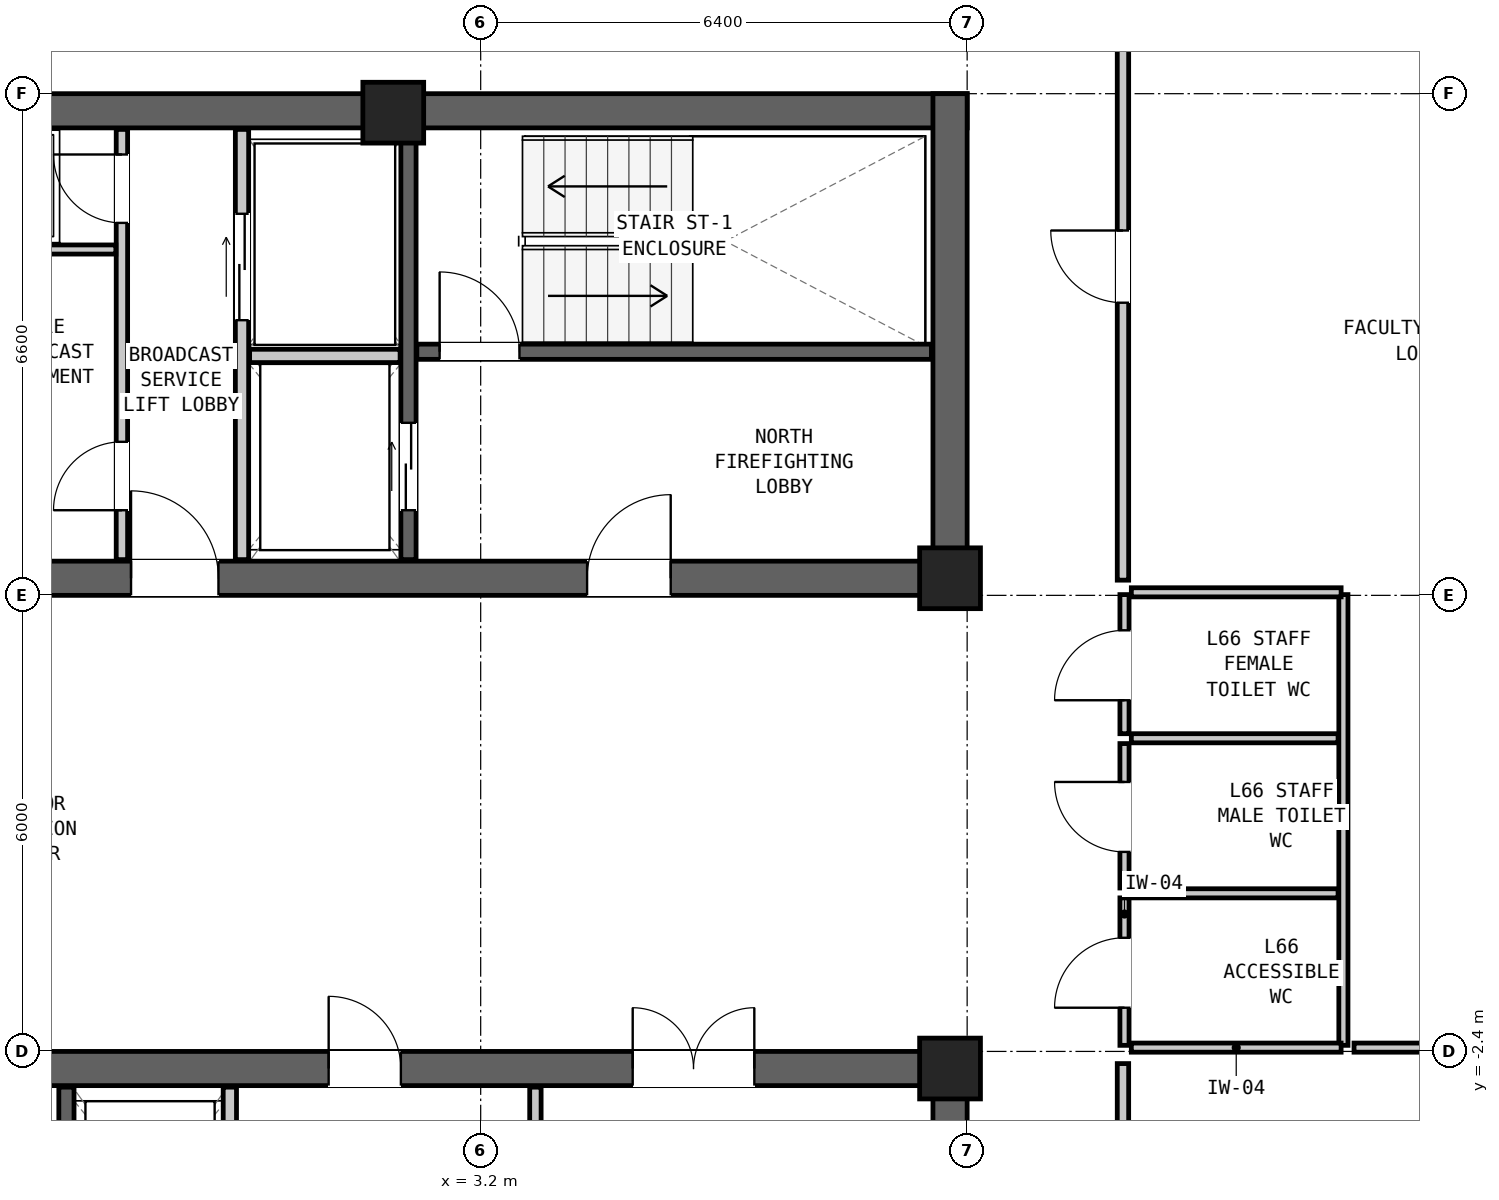
"""IFC4 building model, lengths in metres.
Left out: names, types, materials, properties, quantities, classifications, styles, units other than length and angle.
Written with IfcOpenShell. Run it as: python <this file> out.ifc"""

import sys

from ifc_helpers import new_model, si_unit, direction, frame, frame_2d, origin, origin_2d, place, context, subcontext, project, spatial, rectangle, extrude, element, fill, save


model = new_model("IFC4")
c1 = context("Model", 3, precision=1e-05, world=origin(), true_north=direction((0.0, 1.0)))
c2 = subcontext(c1, "Body", "Model", "MODEL_VIEW")
j1 = project(units=[si_unit("LENGTHUNIT", "METRE"), si_unit("PLANEANGLEUNIT", "RADIAN")], contexts=[c1])
p1 = place(None, origin())
s1 = spatial("IfcSite", under=j1, at=p1, CompositionType="ELEMENT")
p2 = place(p1, origin())
s2 = spatial("IfcBuilding", under=s1, at=p2, CompositionType="ELEMENT")
p3 = place(p2, frame((0.0, 0.0, 223.9)))
s3 = spatial("IfcBuildingStorey", under=s2, at=p3, CompositionType="ELEMENT", Elevation=223.9)
p4 = place(p3, frame((-9.6, 9.975, 0.0), z_axis=(0.0, 0.0, 1.0), x_axis=(1.0, 0.0, 0.0)))
e1 = element("IfcWall", 1, at=p4, inside=s3, PredefinedType="SHEAR", context=c2, shape_type="SweptSolid", body=[
    extrude(rectangle(XDim=19.2, YDim=0.45, at=frame_2d((9.6, 0.0))), origin(), (0.0, 0.0, 1.0), 3.05),
])
p5 = place(p3, frame((-9.6, 3.825, 0.0), z_axis=(0.0, 0.0, 1.0), x_axis=(1.0, 0.0, 0.0)))
e2 = element("IfcWall", 2, at=p5, inside=s3, PredefinedType="SHEAR", context=c2, shape_type="SweptSolid", body=[
    extrude(rectangle(XDim=19.2, YDim=0.45, at=frame_2d((9.6, 0.0))), origin(), (0.0, 0.0, 1.0), 3.05),
])
p6 = place(p5, frame((14.2, 0.0, 0.0)))
e3 = element("IfcOpeningElement", 3, at=p6, cuts=e2, PredefinedType="OPENING", context=c2, shape_type="SweptSolid", body=[
    extrude(rectangle(XDim=1.1, YDim=2.08, at=frame_2d((0.55, 1.04))), frame((0.0, 0.237, 0.0), z_axis=(0.0, -1.0, 0.0), x_axis=(1.0, 0.0, 0.0)), (0.0, 0.0, 1.0), 0.474),
])
p7 = place(p5, frame((8.2, 0.0, 0.0)))
e4 = element("IfcOpeningElement", 4, at=p7, cuts=e2, PredefinedType="OPENING", context=c2, shape_type="SweptSolid", body=[
    extrude(rectangle(XDim=1.15, YDim=2.1, at=frame_2d((0.575, 1.05))), frame((0.0, 0.237, 0.0), z_axis=(0.0, -1.0, 0.0), x_axis=(1.0, 0.0, 0.0)), (0.0, 0.0, 1.0), 0.474),
])
p8 = place(p5, frame((2.5, 0.0, 0.0)))
e5 = element("IfcOpeningElement", 5, at=p8, cuts=e2, PredefinedType="OPENING", context=c2, shape_type="SweptSolid", body=[
    extrude(rectangle(XDim=1.2, YDim=2.1, at=frame_2d((0.6, 1.05))), frame((0.0, 0.237, 0.0), z_axis=(0.0, -1.0, 0.0), x_axis=(1.0, 0.0, 0.0)), (0.0, 0.0, 1.0), 0.474),
])
p9 = place(p3, frame((9.375, 3.6, 0.0), z_axis=(0.0, 0.0, 1.0), x_axis=(0.0, 1.0, 0.0)))
e6 = element("IfcWall", 6, at=p9, inside=s3, PredefinedType="SHEAR", context=c2, shape_type="SweptSolid", body=[
    extrude(rectangle(XDim=6.6, YDim=0.45, at=frame_2d((3.3, 0.0))), origin(), (0.0, 0.0, 1.0), 3.05),
])
p10 = place(p3, frame((-9.6, -2.625, 0.0), z_axis=(0.0, 0.0, 1.0), x_axis=(1.0, 0.0, 0.0)))
e7 = element("IfcWall", 7, at=p10, inside=s3, PredefinedType="SHEAR", context=c2, shape_type="SweptSolid", body=[
    extrude(rectangle(XDim=19.2, YDim=0.45, at=frame_2d((9.6, 0.0))), origin(), (0.0, 0.0, 1.0), 3.05),
])
p11 = place(p10, frame((3.8, 0.0, 0.0)))
e8 = element("IfcOpeningElement", 8, at=p11, cuts=e7, PredefinedType="OPENING", context=c2, shape_type="SweptSolid", body=[
    extrude(rectangle(XDim=1.1, YDim=2.08, at=frame_2d((0.55, 1.04))), frame((0.0, 0.237, 0.0), z_axis=(0.0, -1.0, 0.0), x_axis=(1.0, 0.0, 0.0)), (0.0, 0.0, 1.0), 0.474),
])
p12 = place(p10, frame((10.8, 0.0, 0.0)))
e9 = element("IfcOpeningElement", 9, at=p12, cuts=e7, PredefinedType="OPENING", context=c2, shape_type="SweptSolid", body=[
    extrude(rectangle(XDim=0.95, YDim=2.1, at=frame_2d((0.475, 1.05))), frame((0.0, 0.237, 0.0), z_axis=(0.0, -1.0, 0.0), x_axis=(1.0, 0.0, 0.0)), (0.0, 0.0, 1.0), 0.474),
])
p13 = place(p10, frame((14.8, 0.0, 0.0)))
e10 = element("IfcOpeningElement", 10, at=p13, cuts=e7, PredefinedType="OPENING", context=c2, shape_type="SweptSolid", body=[
    extrude(rectangle(XDim=1.6, YDim=2.12, at=frame_2d((0.8, 1.06))), frame((0.0, 0.237, 0.0), z_axis=(0.0, -1.0, 0.0), x_axis=(1.0, 0.0, 0.0)), (0.0, 0.0, 1.0), 0.474),
])
p14 = place(p3, frame((9.375, -9.0, 0.0), z_axis=(0.0, 0.0, 1.0), x_axis=(0.0, 1.0, 0.0)))
e11 = element("IfcWall", 11, at=p14, inside=s3, PredefinedType="SHEAR", context=c2, shape_type="SweptSolid", body=[
    extrude(rectangle(XDim=6.6, YDim=0.45, at=frame_2d((3.3, 0.0))), origin(), (0.0, 0.0, 1.0), 3.05),
])
for number, where, z_axis, x_axis in (
    (12, (2.05, 9.95, 0.0), (0.0, 0.0, 1.0), (1.0, 0.0, 0.0)),
    (13, (9.375, 3.825, 0.0), (0.0, 0.0, 1.0), (1.0, 0.0, 0.0)),
    (14, (9.375, -2.625, 0.0), (0.0, 0.0, 1.0), (1.0, 0.0, 0.0)),
):
    element("IfcColumn", number, at=place(p3, frame(where, z_axis=z_axis, x_axis=x_axis)), inside=s3, PredefinedType="COLUMN", context=c2, shape_type="SweptSolid", body=[
        extrude(rectangle(XDim=0.8, YDim=0.8, at=origin_2d()), origin(), (0.0, 0.0, 1.0), 3.05),
    ])
p15 = place(p3, frame((2.36, 6.805, 0.0), z_axis=(0.0, 0.0, 1.0), x_axis=(1.0, 0.0, 0.0)))
e15 = element("IfcWall", 15, at=p15, inside=s3, PredefinedType="SHEAR", context=c2, shape_type="SweptSolid", body=[
    extrude(rectangle(XDim=6.77, YDim=0.2, at=frame_2d((3.385, 0.0))), origin(), (0.0, 0.0, 1.0), 2.86),
])
p16 = place(p15, frame((0.3, 0.0, 0.0)))
e16 = element("IfcOpeningElement", 16, at=p16, cuts=e15, PredefinedType="OPENING", context=c2, shape_type="SweptSolid", body=[
    extrude(rectangle(XDim=1.05, YDim=2.08, at=frame_2d((0.525, 1.04))), frame((0.0, 0.112, 0.0), z_axis=(0.0, -1.0, 0.0), x_axis=(1.0, 0.0, 0.0)), (0.0, 0.0, 1.0), 0.224),
])
p17 = place(p3, frame((2.25, 4.07, 0.0), z_axis=(0.0, 0.0, 1.0), x_axis=(0.0, 1.0, 0.0)))
e17 = element("IfcWall", 17, at=p17, inside=s3, PredefinedType="SHEAR", context=c2, shape_type="SweptSolid", body=[
    extrude(rectangle(XDim=5.66, YDim=0.2, at=frame_2d((2.83, 0.0))), origin(), (0.0, 0.0, 1.0), 2.86),
])
p18 = place(p17, frame((0.65, 0.0, 0.0)))
e18 = element("IfcOpeningElement", 18, at=p18, cuts=e17, PredefinedType="OPENING", context=c2, shape_type="SweptSolid", body=[
    extrude(rectangle(XDim=1.15, YDim=2.08, at=frame_2d((0.575, 1.04))), frame((0.0, 0.112, 0.0), z_axis=(0.0, -1.0, 0.0), x_axis=(1.0, 0.0, 0.0)), (0.0, 0.0, 1.0), 0.224),
])
p19 = place(p3, frame((0.06, 4.07, 0.0), z_axis=(0.0, 0.0, 1.0), x_axis=(0.0, 1.0, 0.0)))
e19 = element("IfcWall", 19, at=p19, inside=s3, PredefinedType="PARTITIONING", context=c2, shape_type="SweptSolid", body=[
    extrude(rectangle(XDim=5.66, YDim=0.175, at=frame_2d((2.83, 0.0))), origin(), (0.0, 0.0, 1.0), 2.86),
])
p20 = place(p19, frame((3.15, 0.0, 0.0)))
e20 = element("IfcOpeningElement", 20, at=p20, cuts=e19, PredefinedType="OPENING", context=c2, shape_type="SweptSolid", body=[
    extrude(rectangle(XDim=1.4, YDim=2.12, at=frame_2d((0.7, 1.06))), frame((0.0, 0.1, 0.0), z_axis=(0.0, -1.0, 0.0), x_axis=(1.0, 0.0, 0.0)), (0.0, 0.0, 1.0), 0.199),
])
p21 = place(p3, frame((0.16, 6.75, 0.0), z_axis=(0.0, 0.0, 1.0), x_axis=(1.0, 0.0, 0.0)))
e21 = element("IfcWall", 21, at=p21, inside=s3, PredefinedType="PARTITIONING", context=c2, shape_type="SweptSolid", body=[
    extrude(rectangle(XDim=1.98, YDim=0.175, at=frame_2d((0.99, 0.0))), origin(), (0.0, 0.0, 1.0), 2.86),
])
p22 = place(p3, frame((-1.52, 4.07, 0.0), z_axis=(0.0, 0.0, 1.0), x_axis=(0.0, 1.0, 0.0)))
e22 = element("IfcWall", 22, at=p22, inside=s3, PredefinedType="PARTITIONING", context=c2, shape_type="SweptSolid", body=[
    extrude(rectangle(XDim=5.66, YDim=0.15, at=frame_2d((2.83, 0.0))), origin(), (0.0, 0.0, 1.0), 2.86),
])
p23 = place(p22, frame((4.43, 0.0, 0.0)))
e23 = element("IfcOpeningElement", 23, at=p23, cuts=e22, PredefinedType="OPENING", context=c2, shape_type="SweptSolid", body=[
    extrude(rectangle(XDim=0.9, YDim=2.05, at=frame_2d((0.45, 1.025))), frame((0.0, 0.087, 0.0), z_axis=(0.0, -1.0, 0.0), x_axis=(1.0, 0.0, 0.0)), (0.0, 0.0, 1.0), 0.174),
])
p24 = place(p22, frame((0.65, 0.0, 0.0)))
e24 = element("IfcOpeningElement", 24, at=p24, cuts=e22, PredefinedType="OPENING", context=c2, shape_type="SweptSolid", body=[
    extrude(rectangle(XDim=0.9, YDim=2.05, at=frame_2d((0.45, 1.025))), frame((0.0, 0.087, 0.0), z_axis=(0.0, -1.0, 0.0), x_axis=(1.0, 0.0, 0.0)), (0.0, 0.0, 1.0), 0.174),
])
p25 = place(p3, frame((-2.96, 8.15, 0.0), z_axis=(0.0, 0.0, 1.0), x_axis=(1.0, 0.0, 0.0)))
e25 = element("IfcWall", 25, at=p25, inside=s3, PredefinedType="PARTITIONING", context=c2, shape_type="SweptSolid", body=[
    extrude(rectangle(XDim=1.36, YDim=0.12, at=frame_2d((0.68, 0.0))), origin(), (0.0, 0.0, 1.0), 2.86),
])
p26 = place(p3, frame((-2.25, -8.53, 0.0), z_axis=(0.0, 0.0, 1.0), x_axis=(0.0, 1.0, 0.0)))
e26 = element("IfcWall", 26, at=p26, inside=s3, PredefinedType="SHEAR", context=c2, shape_type="SweptSolid", body=[
    extrude(rectangle(XDim=5.66, YDim=0.2, at=frame_2d((2.83, 0.0))), origin(), (0.0, 0.0, 1.0), 2.86),
])
p27 = place(p26, frame((3.4, 0.0, 0.0)))
e27 = element("IfcOpeningElement", 27, at=p27, cuts=e26, PredefinedType="OPENING", context=c2, shape_type="SweptSolid", body=[
    extrude(rectangle(XDim=1.15, YDim=2.08, at=frame_2d((0.575, 1.04))), frame((0.0, 0.112, 0.0), z_axis=(0.0, -1.0, 0.0), x_axis=(1.0, 0.0, 0.0)), (0.0, 0.0, 1.0), 0.224),
])
p28 = place(p3, frame((-0.1, -8.53, 0.0), z_axis=(0.0, 0.0, 1.0), x_axis=(0.0, 1.0, 0.0)))
e28 = element("IfcWall", 28, at=p28, inside=s3, PredefinedType="PARTITIONING", context=c2, shape_type="SweptSolid", body=[
    extrude(rectangle(XDim=5.66, YDim=0.175, at=frame_2d((2.83, 0.0))), origin(), (0.0, 0.0, 1.0), 2.86),
])
p29 = place(p28, frame((0.45, 0.0, 0.0)))
e29 = element("IfcOpeningElement", 29, at=p29, cuts=e28, PredefinedType="OPENING", context=c2, shape_type="SweptSolid", body=[
    extrude(rectangle(XDim=0.9, YDim=2.05, at=frame_2d((0.45, 1.025))), frame((0.0, 0.1, 0.0), z_axis=(0.0, -1.0, 0.0), x_axis=(1.0, 0.0, 0.0)), (0.0, 0.0, 1.0), 0.199),
])
p30 = place(p3, frame((3.92, -8.53, 0.0), z_axis=(0.0, 0.0, 1.0), x_axis=(0.0, 1.0, 0.0)))
e30 = element("IfcWall", 30, at=p30, inside=s3, PredefinedType="PARTITIONING", context=c2, shape_type="SweptSolid", body=[
    extrude(rectangle(XDim=5.66, YDim=0.15, at=frame_2d((2.83, 0.0))), origin(), (0.0, 0.0, 1.0), 2.86),
])
p31 = place(p3, frame((11.67, -2.32, 0.0), z_axis=(0.0, 0.0, 1.0), x_axis=(0.0, 1.0, 0.0)))
e31 = element("IfcWall", 31, at=p31, inside=s3, PredefinedType="PARTITIONING", context=c2, shape_type="SweptSolid", body=[
    extrude(rectangle(XDim=1.94, YDim=0.12, at=frame_2d((0.97, 0.0))), origin(), (0.0, 0.0, 1.0), 2.86),
])
p32 = place(p31, frame((0.495, 0.0, 0.0)))
e32 = element("IfcOpeningElement", 32, at=p32, cuts=e31, PredefinedType="OPENING", context=c2, shape_type="SweptSolid", body=[
    extrude(rectangle(XDim=0.92, YDim=2.1, at=frame_2d((0.46, 1.05))), frame((0.0, 0.072, 0.0), z_axis=(0.0, -1.0, 0.0), x_axis=(1.0, 0.0, 0.0)), (0.0, 0.0, 1.0), 0.144),
])
p33 = place(p3, frame((11.67, -0.25, 0.0), z_axis=(0.0, 0.0, 1.0), x_axis=(0.0, 1.0, 0.0)))
e33 = element("IfcWall", 33, at=p33, inside=s3, PredefinedType="PARTITIONING", context=c2, shape_type="SweptSolid", body=[
    extrude(rectangle(XDim=1.9, YDim=0.12, at=frame_2d((0.95, 0.0))), origin(), (0.0, 0.0, 1.0), 2.86),
])
p34 = place(p33, frame((0.475, 0.0, 0.0)))
e34 = element("IfcOpeningElement", 34, at=p34, cuts=e33, PredefinedType="OPENING", context=c2, shape_type="SweptSolid", body=[
    extrude(rectangle(XDim=0.92, YDim=2.1, at=frame_2d((0.46, 1.05))), frame((0.0, 0.072, 0.0), z_axis=(0.0, -1.0, 0.0), x_axis=(1.0, 0.0, 0.0)), (0.0, 0.0, 1.0), 0.144),
])
p35 = place(p3, frame((11.67, 1.78, 0.0), z_axis=(0.0, 0.0, 1.0), x_axis=(0.0, 1.0, 0.0)))
e35 = element("IfcWall", 35, at=p35, inside=s3, PredefinedType="PARTITIONING", context=c2, shape_type="SweptSolid", body=[
    extrude(rectangle(XDim=1.83, YDim=0.12, at=frame_2d((0.915, 0.0))), origin(), (0.0, 0.0, 1.0), 2.86),
])
p36 = place(p35, frame((0.44, 0.0, 0.0)))
e36 = element("IfcOpeningElement", 36, at=p36, cuts=e35, PredefinedType="OPENING", context=c2, shape_type="SweptSolid", body=[
    extrude(rectangle(XDim=0.92, YDim=2.1, at=frame_2d((0.46, 1.05))), frame((0.0, 0.072, 0.0), z_axis=(0.0, -1.0, 0.0), x_axis=(1.0, 0.0, 0.0)), (0.0, 0.0, 1.0), 0.144),
])
p37 = place(p3, frame((14.55, -2.32, 0.0), z_axis=(0.0, 0.0, 1.0), x_axis=(0.0, 1.0, 0.0)))
e37 = element("IfcWall", 37, at=p37, inside=s3, PredefinedType="PARTITIONING", context=c2, shape_type="SweptSolid", body=[
    extrude(rectangle(XDim=5.93, YDim=0.12, at=frame_2d((2.965, 0.0))), origin(), (0.0, 0.0, 1.0), 2.86),
])
for number, where, z_axis, x_axis in (
    (38, (11.76, -2.35, 0.0), (0.0, 0.0, 1.0), (1.0, 0.0, 0.0)),
    (39, (11.76, 3.64, 0.0), (0.0, 0.0, 1.0), (1.0, 0.0, 0.0)),
):
    element("IfcWall", number, at=place(p3, frame(where, z_axis=z_axis, x_axis=x_axis)), inside=s3, PredefinedType="PARTITIONING", context=c2, shape_type="SweptSolid", body=[
        extrude(rectangle(XDim=2.76, YDim=0.12, at=frame_2d((1.38, 0.0))), origin(), (0.0, 0.0, 1.0), 1.04),
    ])
for number, where, z_axis, x_axis in (
    (40, (11.76, -0.32, 0.0), (0.0, 0.0, 1.0), (1.0, 0.0, 0.0)),
    (41, (11.76, 1.72, 0.0), (0.0, 0.0, 1.0), (1.0, 0.0, 0.0)),
):
    element("IfcWall", number, at=place(p3, frame(where, z_axis=z_axis, x_axis=x_axis)), inside=s3, PredefinedType="PARTITIONING", context=c2, shape_type="SweptSolid", body=[
        extrude(rectangle(XDim=2.72, YDim=0.12, at=frame_2d((1.36, 0.0))), origin(), (0.0, 0.0, 1.0), 2.86),
    ])
p38 = place(p3, frame((14.69, -2.35, 0.0), z_axis=(0.0, 0.0, 1.0), x_axis=(1.0, 0.0, 0.0)))
e42 = element("IfcWall", 42, at=p38, inside=s3, PredefinedType="PARTITIONING", context=c2, shape_type="SweptSolid", body=[
    extrude(rectangle(XDim=4.69, YDim=0.12, at=frame_2d((2.345, 0.0))), origin(), (0.0, 0.0, 1.0), 1.04),
])
p39 = place(p3, frame((11.65, -10.85, 0.0), z_axis=(0.0, 0.0, 1.0), x_axis=(0.0, 1.0, 0.0)))
e43 = element("IfcWall", 43, at=p39, inside=s3, PredefinedType="PARTITIONING", context=c2, shape_type="SweptSolid", body=[
    extrude(rectangle(XDim=8.29, YDim=0.15, at=frame_2d((4.145, 0.0))), origin(), (0.0, 0.0, 1.0), 2.86),
])
p40 = place(p39, frame((3.67, 0.0, 0.0)))
e44 = element("IfcOpeningElement", 44, at=p40, cuts=e43, PredefinedType="OPENING", context=c2, shape_type="SweptSolid", body=[
    extrude(rectangle(XDim=0.95, YDim=2.1, at=frame_2d((0.475, 1.05))), frame((0.0, 0.087, 0.0), z_axis=(0.0, -1.0, 0.0), x_axis=(1.0, 0.0, 0.0)), (0.0, 0.0, 1.0), 0.174),
])
p41 = place(p3, frame((11.65, 3.8, 0.0), z_axis=(0.0, 0.0, 1.0), x_axis=(0.0, 1.0, 0.0)))
e45 = element("IfcWall", 45, at=p41, inside=s3, PredefinedType="PARTITIONING", context=c2, shape_type="SweptSolid", body=[
    extrude(rectangle(XDim=8.25, YDim=0.15, at=frame_2d((4.125, 0.0))), origin(), (0.0, 0.0, 1.0), 2.86),
])
p42 = place(p41, frame((3.65, 0.0, 0.0)))
e46 = element("IfcOpeningElement", 46, at=p42, cuts=e45, PredefinedType="OPENING", context=c2, shape_type="SweptSolid", body=[
    extrude(rectangle(XDim=0.95, YDim=2.1, at=frame_2d((0.475, 1.05))), frame((0.0, 0.087, 0.0), z_axis=(0.0, -1.0, 0.0), x_axis=(1.0, 0.0, 0.0)), (0.0, 0.0, 1.0), 0.174),
])
p43 = place(p16, origin())
e47 = element("IfcDoor", 47, at=p43, inside=s3, OperationType="SINGLE_SWING_LEFT", PredefinedType="DOOR", context=c2, shape_type="SweptSolid", body=[
    extrude(rectangle(XDim=1.05, YDim=2.08, at=frame_2d((0.525, 1.04))), frame((0.0, 0.025, 0.0), z_axis=(0.0, -1.0, 0.0), x_axis=(1.0, 0.0, 0.0)), (0.0, 0.0, 1.0), 0.05),
])
fill(e16, e47)
p44 = place(p6, origin())
e48 = element("IfcDoor", 48, at=p44, inside=s3, OperationType="SINGLE_SWING_RIGHT", PredefinedType="DOOR", context=c2, shape_type="SweptSolid", body=[
    extrude(rectangle(XDim=1.1, YDim=2.08, at=frame_2d((0.55, 1.04))), frame((0.0, 0.025, 0.0), z_axis=(0.0, -1.0, 0.0), x_axis=(1.0, 0.0, 0.0)), (0.0, 0.0, 1.0), 0.05),
])
fill(e3, e48)
p45 = place(p18, origin())
e49 = element("IfcDoor", 49, at=p45, inside=s3, OperationType="DOUBLE_DOOR_SLIDING", PredefinedType="DOOR", context=c2, shape_type="SweptSolid", body=[
    extrude(rectangle(XDim=1.15, YDim=2.08, at=frame_2d((0.575, 1.04))), frame((0.0, 0.025, 0.0), z_axis=(0.0, -1.0, 0.0), x_axis=(1.0, 0.0, 0.0)), (0.0, 0.0, 1.0), 0.05),
])
fill(e18, e49)
p46 = place(p20, origin())
e50 = element("IfcDoor", 50, at=p46, inside=s3, OperationType="DOUBLE_DOOR_SLIDING", PredefinedType="DOOR", context=c2, shape_type="SweptSolid", body=[
    extrude(rectangle(XDim=1.4, YDim=2.12, at=frame_2d((0.7, 1.06))), frame((0.0, 0.025, 0.0), z_axis=(0.0, -1.0, 0.0), x_axis=(1.0, 0.0, 0.0)), (0.0, 0.0, 1.0), 0.05),
])
fill(e20, e50)
p47 = place(p7, origin())
e51 = element("IfcDoor", 51, at=p47, inside=s3, OperationType="SINGLE_SWING_LEFT", PredefinedType="DOOR", context=c2, shape_type="SweptSolid", body=[
    extrude(rectangle(XDim=1.15, YDim=2.1, at=frame_2d((0.575, 1.05))), frame((0.0, 0.025, 0.0), z_axis=(0.0, -1.0, 0.0), x_axis=(1.0, 0.0, 0.0)), (0.0, 0.0, 1.0), 0.05),
])
fill(e4, e51)
p48 = place(p23, origin())
e52 = element("IfcDoor", 52, at=p48, inside=s3, OperationType="SINGLE_SWING_RIGHT", PredefinedType="DOOR", context=c2, shape_type="SweptSolid", body=[
    extrude(rectangle(XDim=0.9, YDim=2.05, at=frame_2d((0.45, 1.025))), frame((0.0, 0.025, 0.0), z_axis=(0.0, -1.0, 0.0), x_axis=(1.0, 0.0, 0.0)), (0.0, 0.0, 1.0), 0.05),
])
fill(e23, e52)
p49 = place(p24, origin())
e53 = element("IfcDoor", 53, at=p49, inside=s3, OperationType="SINGLE_SWING_LEFT", PredefinedType="DOOR", context=c2, shape_type="SweptSolid", body=[
    extrude(rectangle(XDim=0.9, YDim=2.05, at=frame_2d((0.45, 1.025))), frame((0.0, 0.025, 0.0), z_axis=(0.0, -1.0, 0.0), x_axis=(1.0, 0.0, 0.0)), (0.0, 0.0, 1.0), 0.05),
])
fill(e24, e53)
p50 = place(p12, origin())
e54 = element("IfcDoor", 54, at=p50, inside=s3, OperationType="SINGLE_SWING_LEFT", PredefinedType="DOOR", context=c2, shape_type="SweptSolid", body=[
    extrude(rectangle(XDim=0.95, YDim=2.1, at=frame_2d((0.475, 1.05))), frame((0.0, 0.025, 0.0), z_axis=(0.0, -1.0, 0.0), x_axis=(1.0, 0.0, 0.0)), (0.0, 0.0, 1.0), 0.05),
])
fill(e9, e54)
p51 = place(p13, origin())
e55 = element("IfcDoor", 55, at=p51, inside=s3, OperationType="DOUBLE_DOOR_SINGLE_SWING", PredefinedType="DOOR", context=c2, shape_type="SweptSolid", body=[
    extrude(rectangle(XDim=1.6, YDim=2.12, at=frame_2d((0.8, 1.06))), frame((0.0, 0.025, 0.0), z_axis=(0.0, -1.0, 0.0), x_axis=(1.0, 0.0, 0.0)), (0.0, 0.0, 1.0), 0.05),
])
fill(e10, e55)
p52 = place(p32, origin())
e56 = element("IfcDoor", 56, at=p52, inside=s3, OperationType="SINGLE_SWING_LEFT", PredefinedType="DOOR", context=c2, shape_type="SweptSolid", body=[
    extrude(rectangle(XDim=0.92, YDim=2.1, at=frame_2d((0.46, 1.05))), frame((0.0, 0.025, 0.0), z_axis=(0.0, -1.0, 0.0), x_axis=(1.0, 0.0, 0.0)), (0.0, 0.0, 1.0), 0.05),
])
fill(e32, e56)
p53 = place(p34, origin())
e57 = element("IfcDoor", 57, at=p53, inside=s3, OperationType="SINGLE_SWING_RIGHT", PredefinedType="DOOR", context=c2, shape_type="SweptSolid", body=[
    extrude(rectangle(XDim=0.92, YDim=2.1, at=frame_2d((0.46, 1.05))), frame((0.0, 0.025, 0.0), z_axis=(0.0, -1.0, 0.0), x_axis=(1.0, 0.0, 0.0)), (0.0, 0.0, 1.0), 0.05),
])
fill(e34, e57)
p54 = place(p36, origin())
e58 = element("IfcDoor", 58, at=p54, inside=s3, OperationType="SINGLE_SWING_LEFT", PredefinedType="DOOR", context=c2, shape_type="SweptSolid", body=[
    extrude(rectangle(XDim=0.92, YDim=2.1, at=frame_2d((0.46, 1.05))), frame((0.0, 0.025, 0.0), z_axis=(0.0, -1.0, 0.0), x_axis=(1.0, 0.0, 0.0)), (0.0, 0.0, 1.0), 0.05),
])
fill(e36, e58)
p55 = place(p42, origin())
e59 = element("IfcDoor", 59, at=p55, inside=s3, OperationType="SINGLE_SWING_RIGHT", PredefinedType="DOOR", context=c2, shape_type="SweptSolid", body=[
    extrude(rectangle(XDim=0.95, YDim=2.1, at=frame_2d((0.475, 1.05))), frame((0.0, 0.025, 0.0), z_axis=(0.0, -1.0, 0.0), x_axis=(1.0, 0.0, 0.0)), (0.0, 0.0, 1.0), 0.05),
])
fill(e46, e59)
save(model, sys.argv[1])
